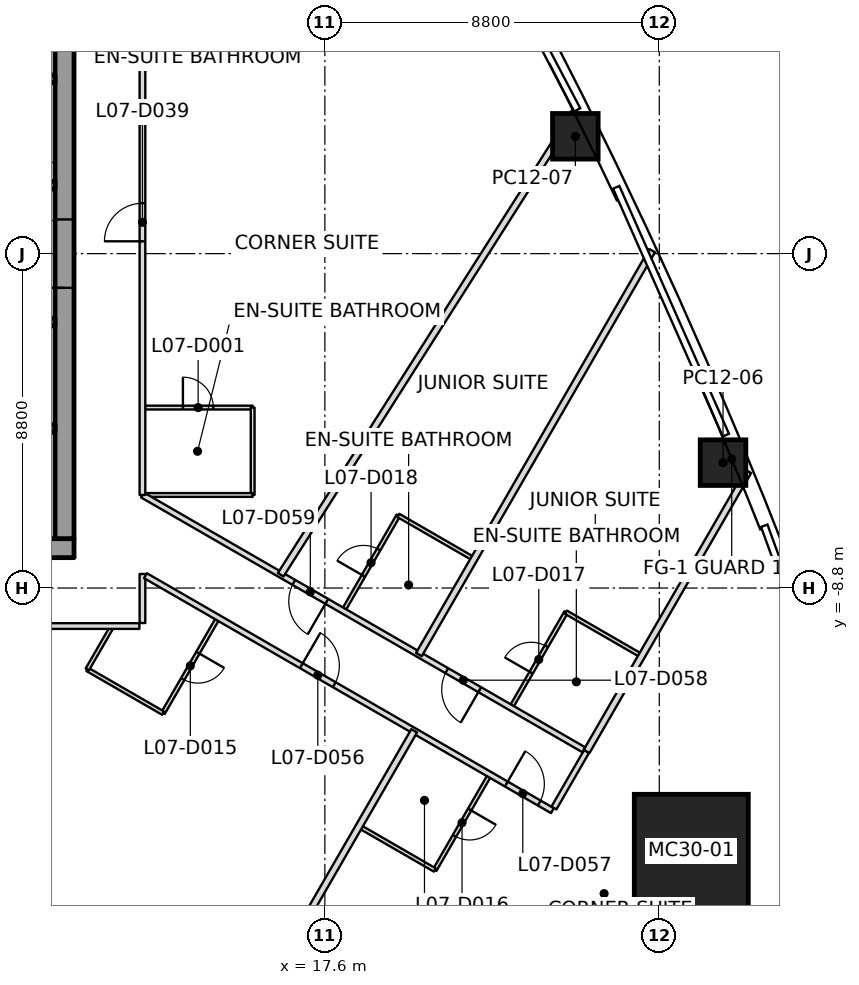
"""IFC4 building model, lengths in metres.
Left out: names, types, materials, properties, quantities, classifications, styles, units other than length and angle.
Written with IfcOpenShell. Run it as: python <this file> out.ifc"""

import sys

from ifc_helpers import new_model, si_unit, direction, frame, frame_2d, origin, origin_2d, place, context, subcontext, project, spatial, rectangle, extrude, clip, halfspace, element, fill, save


model = new_model("IFC4")
c1 = context("Model", 3, precision=1e-05, world=origin(), true_north=direction((0.0, 1.0)))
c2 = subcontext(c1, "Body", "Model", "MODEL_VIEW")
j1 = project(units=[si_unit("LENGTHUNIT", "METRE"), si_unit("PLANEANGLEUNIT", "RADIAN")], contexts=[c1])
p1 = place(None, origin())
s1 = spatial("IfcSite", under=j1, at=p1, CompositionType="ELEMENT")
p2 = place(p1, origin())
s2 = spatial("IfcBuilding", under=s1, at=p2, CompositionType="ELEMENT")
p3 = place(p2, frame((0.0, 0.0, 48.0)))
s3 = spatial("IfcBuildingStorey", under=s2, at=p3, CompositionType="ELEMENT", Elevation=48.0)
p4 = place(p3, frame((27.242, -15.728, 0.0), z_axis=(-0.030597838594, 0.017672889533, 0.99937552564), x_axis=(0.99953177652, 0.000541005533, 0.030593055416)))
e1 = element("IfcColumn", 1, at=p4, inside=s3, PredefinedType="COLUMN", context=c2, shape_type="SweptSolid", body=[
    clip(extrude(rectangle(XDim=3.0, YDim=3.0, at=origin_2d()), origin(), (0.0, 0.0, 1.0), 3.702), halfspace(frame((0.0, 0.0, 0.018)), True)),
])
p5 = place(p3, frame((28.077, -5.5, 0.0), z_axis=(-0.019526598325, 0.011016695677, 0.999748640596), x_axis=(-0.381957446123, 0.924011503162, -0.017642317722)))
e2 = element("IfcColumn", 2, at=p5, inside=s3, PredefinedType="COLUMN", context=c2, shape_type="SweptSolid", body=[
    clip(extrude(rectangle(XDim=1.2, YDim=1.2, at=origin_2d()), origin(), (0.0, 0.0, 1.0), 3.701), halfspace(frame((0.0, 0.0, 0.005)), True)),
])
p6 = place(p3, frame((24.191, 3.088, 0.0), z_axis=(-0.015306644787, 0.002309192102, 0.99988017995), x_axis=(-0.441920685772, 0.897010601558, -0.008836751577)))
e3 = element("IfcColumn", 3, at=p6, inside=s3, PredefinedType="COLUMN", context=c2, shape_type="SweptSolid", body=[
    clip(extrude(rectangle(XDim=1.2, YDim=1.2, at=origin_2d()), origin(), (0.0, 0.0, 1.0), 3.7), halfspace(frame((0.0, 0.0, 0.003)), True)),
])
p7 = place(p3, frame((-11.0, -7.75, 0.0), z_axis=(0.0, 0.0, 1.0), x_axis=(1.0, 0.0, 0.0)))
e4 = element("IfcWall", 4, at=p7, inside=s3, PredefinedType="SHEAR", context=c2, shape_type="SweptSolid", body=[
    extrude(rectangle(XDim=22.0, YDim=0.5, at=frame_2d((11.0, 0.0))), origin(), (0.0, 0.0, 1.0), 3.7),
])
p8 = place(p7, frame((10.45, 0.0, 0.0)))
e5 = element("IfcOpeningElement", 5, at=p8, cuts=e4, PredefinedType="OPENING", context=c2, shape_type="SweptSolid", body=[
    extrude(rectangle(XDim=1.1, YDim=2.1, at=frame_2d((0.55, 1.05))), frame((0.0, 0.25, 0.0), z_axis=(0.0, -1.0, 0.0), x_axis=(1.0, 0.0, 0.0)), (0.0, 0.0, 1.0), 0.5),
])
p9 = place(p3, frame((10.75, -7.5, 0.0), z_axis=(0.0, 0.0, 1.0), x_axis=(0.0, 1.0, 0.0)))
e6 = element("IfcWall", 6, at=p9, inside=s3, PredefinedType="SHEAR", context=c2, shape_type="SweptSolid", body=[
    extrude(rectangle(XDim=15.0, YDim=0.5, at=frame_2d((7.5, 0.0))), origin(), (0.0, 0.0, 1.0), 3.7),
])
p10 = place(p9, frame((6.6, 0.0, 0.0)))
e7 = element("IfcOpeningElement", 7, at=p10, cuts=e6, PredefinedType="OPENING", context=c2, shape_type="SweptSolid", body=[
    extrude(rectangle(XDim=1.8, YDim=2.1, at=frame_2d((0.9, 1.05))), frame((0.0, 0.25, 0.0), z_axis=(0.0, -1.0, 0.0), x_axis=(1.0, 0.0, 0.0)), (0.0, 0.0, 1.0), 0.5),
])
p11 = place(p3, frame((8.7, -4.6, 0.0), z_axis=(0.0, 0.0, 1.0), x_axis=(1.0, 0.0, 0.0)))
e8 = element("IfcWall", 8, at=p11, inside=s3, PredefinedType="SOLIDWALL", context=c2, shape_type="SweptSolid", body=[
    extrude(rectangle(XDim=1.8, YDim=0.2, at=frame_2d((0.9, 0.0))), origin(), (0.0, 0.0, 1.0), 3.55),
])
p12 = place(p11, frame((0.7, 0.0, 0.0)))
e9 = element("IfcOpeningElement", 9, at=p12, cuts=e8, PredefinedType="OPENING", context=c2, shape_type="SweptSolid", body=[
    extrude(rectangle(XDim=1.0, YDim=2.1, at=frame_2d((0.5, 1.05))), frame((0.0, 0.1, 0.0), z_axis=(0.0, -1.0, 0.0), x_axis=(1.0, 0.0, 0.0)), (0.0, 0.0, 1.0), 0.2),
])
p13 = place(p3, frame((8.7, -1.8, 0.0), z_axis=(0.0, 0.0, 1.0), x_axis=(1.0, 0.0, 0.0)))
e10 = element("IfcWall", 10, at=p13, inside=s3, PredefinedType="SOLIDWALL", context=c2, shape_type="SweptSolid", body=[
    extrude(rectangle(XDim=1.8, YDim=0.2, at=frame_2d((0.9, 0.0))), origin(), (0.0, 0.0, 1.0), 3.55),
])
p14 = place(p13, frame((0.35, 0.0, 0.0)))
e11 = element("IfcOpeningElement", 11, at=p14, cuts=e10, PredefinedType="OPENING", context=c2, shape_type="SweptSolid", body=[
    extrude(rectangle(XDim=1.1, YDim=2.1, at=frame_2d((0.55, 1.05))), frame((0.0, 0.1, 0.0), z_axis=(0.0, -1.0, 0.0), x_axis=(1.0, 0.0, 0.0)), (0.0, 0.0, 1.0), 0.2),
])
p15 = place(p3, frame((10.5, 1.8, 0.0), z_axis=(0.0, 0.0, 1.0), x_axis=(-1.0, 0.0, 0.0)))
e12 = element("IfcWall", 12, at=p15, inside=s3, PredefinedType="SOLIDWALL", context=c2, shape_type="SweptSolid", body=[
    extrude(rectangle(XDim=1.8, YDim=0.2, at=frame_2d((0.9, 0.0))), origin(), (0.0, 0.0, 1.0), 3.55),
])
p16 = place(p15, frame((0.4, 0.0, 0.0)))
e13 = element("IfcOpeningElement", 13, at=p16, cuts=e12, PredefinedType="OPENING", context=c2, shape_type="SweptSolid", body=[
    extrude(rectangle(XDim=1.0, YDim=2.1, at=frame_2d((0.5, 1.05))), frame((0.0, 0.1, 0.0), z_axis=(0.0, -1.0, 0.0), x_axis=(1.0, 0.0, 0.0)), (0.0, 0.0, 1.0), 0.2),
])
p17 = place(p3, frame((10.5, 4.6, 0.0), z_axis=(0.0, 0.0, 1.0), x_axis=(-1.0, 0.0, 0.0)))
e14 = element("IfcWall", 14, at=p17, inside=s3, PredefinedType="SOLIDWALL", context=c2, shape_type="SweptSolid", body=[
    extrude(rectangle(XDim=1.8, YDim=0.2, at=frame_2d((0.9, 0.0))), origin(), (0.0, 0.0, 1.0), 3.55),
])
p18 = place(p3, frame((19.95, -12.558, 0.0), z_axis=(0.0, 0.0, 1.0), x_axis=(-0.500004228592, -0.866022962392, 0.0)))
e15 = element("IfcWall", 15, at=p18, inside=s3, PredefinedType="PARTITIONING", context=c2, shape_type="SweptSolid", body=[
    extrude(rectangle(XDim=14.3, YDim=0.175, at=frame_2d((7.15, 0.0))), origin(), (0.0, 0.0, 1.0), 2.797),
])
p19 = place(p3, frame((24.174, 3.728, 0.0), z_axis=(0.0, 0.0, 1.0), x_axis=(-0.536240308602, -0.844065359691, 0.0)))
e16 = element("IfcWall", 16, at=p19, inside=s3, PredefinedType="PARTITIONING", context=c2, shape_type="SweptSolid", body=[
    extrude(rectangle(XDim=14.428, YDim=0.175, at=frame_2d((7.214, 0.0))), origin(), (0.0, 0.0, 1.0), 2.947),
])
p20 = place(p3, frame((20.075, -10.551, 0.0), z_axis=(0.0, 0.0, 1.0), x_axis=(0.499996220184, 0.866027586051, 0.0)))
e17 = element("IfcWall", 17, at=p20, inside=s3, PredefinedType="PARTITIONING", context=c2, shape_type="SweptSolid", body=[
    extrude(rectangle(XDim=12.274, YDim=0.175, at=frame_2d((6.137, 0.0))), origin(), (0.0, 0.0, 1.0), 2.934),
])
p21 = place(p3, frame((24.488, -13.099, 0.0), z_axis=(0.0, 0.0, 1.0), x_axis=(0.500003147101, 0.866023586797, 0.0)))
e18 = element("IfcWall", 18, at=p21, inside=s3, PredefinedType="PARTITIONING", context=c2, shape_type="SweptSolid", body=[
    extrude(rectangle(XDim=8.508, YDim=0.175, at=frame_2d((4.254, 0.0))), origin(), (0.0, 0.0, 1.0), 2.934),
])
p22 = place(p3, frame((-12.72, -9.8, 0.0), z_axis=(0.0, 0.0, 1.0), x_axis=(1.0, 0.0, 0.0)))
e19 = element("IfcWall", 19, at=p22, inside=s3, PredefinedType="PARTITIONING", context=c2, shape_type="SweptSolid", body=[
    extrude(rectangle(XDim=25.44, YDim=0.15, at=frame_2d((12.72, 0.0))), origin(), (0.0, 0.0, 1.0), 2.947),
])
p23 = place(p22, frame((7.32, 0.0, 0.0)))
e20 = element("IfcOpeningElement", 20, at=p23, cuts=e19, PredefinedType="OPENING", context=c2, shape_type="SweptSolid", body=[
    extrude(rectangle(XDim=1.0, YDim=2.1, at=frame_2d((0.5, 1.05))), frame((0.0, 0.075, 0.0), z_axis=(0.0, -1.0, 0.0), x_axis=(1.0, 0.0, 0.0)), (0.0, 0.0, 1.0), 0.15),
])
p24 = place(p22, frame((11.52, 0.0, 0.0)))
e21 = element("IfcOpeningElement", 21, at=p24, cuts=e19, PredefinedType="OPENING", context=c2, shape_type="SweptSolid", body=[
    extrude(rectangle(XDim=1.0, YDim=2.1, at=frame_2d((0.5, 1.05))), frame((0.0, 0.075, 0.0), z_axis=(0.0, -1.0, 0.0), x_axis=(1.0, 0.0, 0.0)), (0.0, 0.0, 1.0), 0.15),
])
p25 = place(p22, frame((15.72, 0.0, 0.0)))
e22 = element("IfcOpeningElement", 22, at=p25, cuts=e19, PredefinedType="OPENING", context=c2, shape_type="SweptSolid", body=[
    extrude(rectangle(XDim=1.0, YDim=2.1, at=frame_2d((0.5, 1.05))), frame((0.0, 0.075, 0.0), z_axis=(0.0, -1.0, 0.0), x_axis=(1.0, 0.0, 0.0)), (0.0, 0.0, 1.0), 0.15),
])
p26 = place(p22, frame((19.92, 0.0, 0.0)))
e23 = element("IfcOpeningElement", 23, at=p26, cuts=e19, PredefinedType="OPENING", context=c2, shape_type="SweptSolid", body=[
    extrude(rectangle(XDim=1.0, YDim=2.1, at=frame_2d((0.5, 1.05))), frame((0.0, 0.075, 0.0), z_axis=(0.0, -1.0, 0.0), x_axis=(1.0, 0.0, 0.0)), (0.0, 0.0, 1.0), 0.15),
])
p27 = place(p3, frame((12.8, -9.72, 0.0), z_axis=(0.0, 0.0, 1.0), x_axis=(0.0, 1.0, 0.0)))
e24 = element("IfcWall", 24, at=p27, inside=s3, PredefinedType="PARTITIONING", context=c2, shape_type="SweptSolid", body=[
    extrude(rectangle(XDim=1.291, YDim=0.15, at=frame_2d((0.646, 0.0))), origin(), (0.0, 0.0, 1.0), 2.797),
])
p28 = place(p3, frame((12.879, -8.475, 0.0), z_axis=(0.0, 0.0, 1.0), x_axis=(0.866021836803, -0.500006178143, 0.0)))
e25 = element("IfcWall", 25, at=p28, inside=s3, PredefinedType="PARTITIONING", context=c2, shape_type="SweptSolid", body=[
    extrude(rectangle(XDim=12.365, YDim=0.15, at=frame_2d((6.182, 0.0))), origin(), (0.0, 0.0, 1.0), 2.797),
])
p29 = place(p28, frame((4.737, 0.0, 0.0)))
e26 = element("IfcOpeningElement", 26, at=p29, cuts=e25, PredefinedType="OPENING", context=c2, shape_type="SweptSolid", body=[
    extrude(rectangle(XDim=1.0, YDim=2.1, at=frame_2d((0.5, 1.05))), frame((0.0, 0.075, 0.0), z_axis=(0.0, -1.0, 0.0), x_axis=(1.0, 0.0, 0.0)), (0.0, 0.0, 1.0), 0.15),
])
p30 = place(p28, frame((10.965, 0.0, 0.0)))
e27 = element("IfcOpeningElement", 27, at=p30, cuts=e25, PredefinedType="OPENING", context=c2, shape_type="SweptSolid", body=[
    extrude(rectangle(XDim=1.0, YDim=2.1, at=frame_2d((0.5, 1.05))), frame((0.0, 0.075, 0.0), z_axis=(0.0, -1.0, 0.0), x_axis=(1.0, 0.0, 0.0)), (0.0, 0.0, 1.0), 0.15),
])
p31 = place(p3, frame((23.627, -14.588, 0.0), z_axis=(0.0, 0.0, 1.0), x_axis=(0.500062383118, 0.865989383878, 0.0)))
e28 = element("IfcWall", 28, at=p31, inside=s3, PredefinedType="PARTITIONING", context=c2, shape_type="SweptSolid", body=[
    extrude(rectangle(XDim=1.72, YDim=0.15, at=frame_2d((0.86, 0.0))), origin(), (0.0, 0.0, 1.0), 2.797),
])
p32 = place(p3, frame((24.418, -13.059, 0.0), z_axis=(0.0, 0.0, 1.0), x_axis=(-0.866024967305, 0.500000756004, 0.0)))
e29 = element("IfcWall", 29, at=p32, inside=s3, PredefinedType="PARTITIONING", context=c2, shape_type="SweptSolid", body=[
    extrude(rectangle(XDim=13.416, YDim=0.15, at=frame_2d((6.708, 0.0))), origin(), (0.0, 0.0, 1.0), 2.947),
])
p33 = place(p32, frame((3.168, 0.0, 0.0)))
e30 = element("IfcOpeningElement", 30, at=p33, cuts=e29, PredefinedType="OPENING", context=c2, shape_type="SweptSolid", body=[
    extrude(rectangle(XDim=1.0, YDim=2.1, at=frame_2d((0.5, 1.05))), frame((0.0, 0.075, 0.0), z_axis=(0.0, -1.0, 0.0), x_axis=(1.0, 0.0, 0.0)), (0.0, 0.0, 1.0), 0.15),
])
p34 = place(p32, frame((7.815, 0.0, 0.0)))
e31 = element("IfcOpeningElement", 31, at=p34, cuts=e29, PredefinedType="OPENING", context=c2, shape_type="SweptSolid", body=[
    extrude(rectangle(XDim=1.0, YDim=2.1, at=frame_2d((0.5, 1.05))), frame((0.0, 0.075, 0.0), z_axis=(0.0, -1.0, 0.0), x_axis=(1.0, 0.0, 0.0)), (0.0, 0.0, 1.0), 0.15),
])
p35 = place(p3, frame((12.8, -6.351, 0.0), z_axis=(0.0, 0.0, 1.0), x_axis=(0.0, 1.0, 0.0)))
e32 = element("IfcWall", 32, at=p35, inside=s3, PredefinedType="PARTITIONING", context=c2, shape_type="SweptSolid", body=[
    extrude(rectangle(XDim=16.071, YDim=0.15, at=frame_2d((8.035, 0.0))), origin(), (0.0, 0.0, 1.0), 3.017),
])
p36 = place(p35, frame((6.676, 0.0, 0.0)))
e33 = element("IfcOpeningElement", 33, at=p36, cuts=e32, PredefinedType="OPENING", context=c2, shape_type="SweptSolid", body=[
    extrude(rectangle(XDim=1.0, YDim=2.1, at=frame_2d((0.5, 1.05))), frame((0.0, 0.075, 0.0), z_axis=(0.0, -1.0, 0.0), x_axis=(1.0, 0.0, 0.0)), (0.0, 0.0, 1.0), 0.15),
])
p37 = place(p35, frame((14.751, 0.0, 0.0)))
e34 = element("IfcOpeningElement", 34, at=p37, cuts=e32, PredefinedType="OPENING", context=c2, shape_type="SweptSolid", body=[
    extrude(rectangle(XDim=1.0, YDim=2.1, at=frame_2d((0.5, 1.05))), frame((0.0, 0.075, 0.0), z_axis=(0.0, -1.0, 0.0), x_axis=(1.0, 0.0, 0.0)), (0.0, 0.0, 1.0), 0.15),
])
p38 = place(p3, frame((14.777, -9.605, 0.0), z_axis=(0.0, 0.0, 1.0), x_axis=(-0.499999802827, -0.866025517622, 0.0)))
e35 = element("IfcWall", 35, at=p38, inside=s3, PredefinedType="PARTITIONING", context=c2, shape_type="SweptSolid", body=[
    extrude(rectangle(XDim=2.87, YDim=0.1, at=frame_2d((1.435, 0.0))), origin(), (0.0, 0.0, 1.0), 2.797),
])
p39 = place(p38, frame((1.035, 0.0, 0.0)))
e36 = element("IfcOpeningElement", 36, at=p39, cuts=e35, PredefinedType="OPENING", context=c2, shape_type="SweptSolid", body=[
    extrude(rectangle(XDim=0.8, YDim=2.1, at=frame_2d((0.4, 1.05))), frame((0.0, 0.05, 0.0), z_axis=(0.0, -1.0, 0.0), x_axis=(1.0, 0.0, 0.0)), (0.0, 0.0, 1.0), 0.1),
])
p40 = place(p3, frame((13.342, -12.091, 0.0), z_axis=(0.0, 0.0, 1.0), x_axis=(-0.86602648383, 0.499998129301, 0.0)))
e37 = element("IfcWall", 37, at=p40, inside=s3, PredefinedType="PARTITIONING", context=c2, shape_type="SweptSolid", body=[
    extrude(rectangle(XDim=2.3, YDim=0.1, at=frame_2d((1.15, 0.0))), origin(), (0.0, 0.0, 1.0), 2.947),
])
p41 = place(p3, frame((11.35, -10.941, 0.0), z_axis=(0.0, 0.0, 1.0), x_axis=(0.499865263774, 0.866103179807, 0.0)))
e38 = element("IfcWall", 38, at=p41, inside=s3, PredefinedType="PARTITIONING", context=c2, shape_type="SweptSolid", body=[
    extrude(rectangle(XDim=1.282, YDim=0.1, at=frame_2d((0.641, 0.0))), origin(), (0.0, 0.0, 1.0), 3.15),
])
p42 = place(p3, frame((12.83, -4.051, 0.0), z_axis=(0.0, 0.0, 1.0), x_axis=(1.0, 0.0, 0.0)))
e39 = element("IfcWall", 39, at=p42, inside=s3, PredefinedType="PARTITIONING", context=c2, shape_type="SweptSolid", body=[
    extrude(rectangle(XDim=2.87, YDim=0.1, at=frame_2d((1.435, 0.0))), origin(), (0.0, 0.0, 1.0), 3.15),
])
p43 = place(p42, frame((1.035, 0.0, 0.0)))
e40 = element("IfcOpeningElement", 40, at=p43, cuts=e39, PredefinedType="OPENING", context=c2, shape_type="SweptSolid", body=[
    extrude(rectangle(XDim=0.8, YDim=2.1, at=frame_2d((0.4, 1.05))), frame((0.0, 0.05, 0.0), z_axis=(0.0, -1.0, 0.0), x_axis=(1.0, 0.0, 0.0)), (0.0, 0.0, 1.0), 0.1),
])
p44 = place(p3, frame((15.7, -4.051, 0.0), z_axis=(0.0, 0.0, 1.0), x_axis=(0.0, -1.0, 0.0)))
e41 = element("IfcWall", 41, at=p44, inside=s3, PredefinedType="PARTITIONING", context=c2, shape_type="SweptSolid", body=[
    extrude(rectangle(XDim=2.3, YDim=0.1, at=frame_2d((1.15, 0.0))), origin(), (0.0, 0.0, 1.0), 2.947),
])
p45 = place(p3, frame((15.7, -6.351, 0.0), z_axis=(0.0, 0.0, 1.0), x_axis=(-1.0, 0.0, 0.0)))
e42 = element("IfcWall", 42, at=p45, inside=s3, PredefinedType="PARTITIONING", context=c2, shape_type="SweptSolid", body=[
    extrude(rectangle(XDim=2.84, YDim=0.1, at=frame_2d((1.42, 0.0))), origin(), (0.0, 0.0, 1.0), 2.947),
])
p46 = place(p3, frame((18.098, -9.375, 0.0), z_axis=(0.0, 0.0, 1.0), x_axis=(0.499936001555, 0.866062350151, 0.0)))
e43 = element("IfcWall", 43, at=p46, inside=s3, PredefinedType="PARTITIONING", context=c2, shape_type="SweptSolid", body=[
    extrude(rectangle(XDim=2.87, YDim=0.1, at=frame_2d((1.435, 0.0))), origin(), (0.0, 0.0, 1.0), 2.947),
])
p47 = place(p46, frame((1.035, 0.0, 0.0)))
e44 = element("IfcOpeningElement", 44, at=p47, cuts=e43, PredefinedType="OPENING", context=c2, shape_type="SweptSolid", body=[
    extrude(rectangle(XDim=0.8, YDim=2.1, at=frame_2d((0.4, 1.05))), frame((0.0, 0.05, 0.0), z_axis=(0.0, -1.0, 0.0), x_axis=(1.0, 0.0, 0.0)), (0.0, 0.0, 1.0), 0.1),
])
p48 = place(p3, frame((19.533, -6.889, 0.0), z_axis=(0.0, 0.0, 1.0), x_axis=(0.866017224141, -0.500014167291, 0.0)))
e45 = element("IfcWall", 45, at=p48, inside=s3, PredefinedType="PARTITIONING", context=c2, shape_type="SweptSolid", body=[
    extrude(rectangle(XDim=2.27, YDim=0.1, at=frame_2d((1.135, 0.0))), origin(), (0.0, 0.0, 1.0), 2.947),
])
p49 = place(p3, frame((21.927, -13.733, 0.0), z_axis=(0.0, 0.0, 1.0), x_axis=(-0.499936001555, -0.866062350151, 0.0)))
e46 = element("IfcWall", 46, at=p49, inside=s3, PredefinedType="PARTITIONING", context=c2, shape_type="SweptSolid", body=[
    extrude(rectangle(XDim=2.87, YDim=0.1, at=frame_2d((1.435, 0.0))), origin(), (0.0, 0.0, 1.0), 3.15),
])
p50 = place(p49, frame((1.035, 0.0, 0.0)))
e47 = element("IfcOpeningElement", 47, at=p50, cuts=e46, PredefinedType="OPENING", context=c2, shape_type="SweptSolid", body=[
    extrude(rectangle(XDim=0.8, YDim=2.1, at=frame_2d((0.4, 1.05))), frame((0.0, 0.05, 0.0), z_axis=(0.0, -1.0, 0.0), x_axis=(1.0, 0.0, 0.0)), (0.0, 0.0, 1.0), 0.1),
])
p51 = place(p3, frame((20.492, -16.219, 0.0), z_axis=(0.0, 0.0, 1.0), x_axis=(-0.866044110172, 0.499967598186, 0.0)))
e48 = element("IfcWall", 48, at=p51, inside=s3, PredefinedType="PARTITIONING", context=c2, shape_type="SweptSolid", body=[
    extrude(rectangle(XDim=2.27, YDim=0.1, at=frame_2d((1.135, 0.0))), origin(), (0.0, 0.0, 1.0), 3.15),
])
p52 = place(p3, frame((22.511, -11.923, 0.0), z_axis=(0.0, 0.0, 1.0), x_axis=(0.500036638401, 0.866004249561, 0.0)))
e49 = element("IfcWall", 49, at=p52, inside=s3, PredefinedType="PARTITIONING", context=c2, shape_type="SweptSolid", body=[
    extrude(rectangle(XDim=2.87, YDim=0.1, at=frame_2d((1.435, 0.0))), origin(), (0.0, 0.0, 1.0), 3.15),
])
p53 = place(p52, frame((1.035, 0.0, 0.0)))
e50 = element("IfcOpeningElement", 50, at=p53, cuts=e49, PredefinedType="OPENING", context=c2, shape_type="SweptSolid", body=[
    extrude(rectangle(XDim=0.8, YDim=2.1, at=frame_2d((0.4, 1.05))), frame((0.0, 0.05, 0.0), z_axis=(0.0, -1.0, 0.0), x_axis=(1.0, 0.0, 0.0)), (0.0, 0.0, 1.0), 0.1),
])
p54 = place(p3, frame((23.946, -9.437, 0.0), z_axis=(0.0, 0.0, 1.0), x_axis=(0.866017224141, -0.500014167291, 0.0)))
e51 = element("IfcWall", 51, at=p54, inside=s3, PredefinedType="PARTITIONING", context=c2, shape_type="SweptSolid", body=[
    extrude(rectangle(XDim=2.27, YDim=0.1, at=frame_2d((1.135, 0.0))), origin(), (0.0, 0.0, 1.0), 3.15),
])
p55 = place(p36, origin())
e52 = element("IfcDoor", 52, at=p55, inside=s3, OperationType="SINGLE_SWING_LEFT", PredefinedType="DOOR", context=c2, shape_type="SweptSolid", body=[
    extrude(rectangle(XDim=1.0, YDim=2.1, at=frame_2d((0.5, 1.05))), frame((0.0, 0.025, 0.0), z_axis=(0.0, -1.0, 0.0), x_axis=(1.0, 0.0, 0.0)), (0.0, 0.0, 1.0), 0.05),
])
fill(e33, e52)
p56 = place(p43, origin())
e53 = element("IfcDoor", 53, at=p56, inside=s3, OperationType="SINGLE_SWING_RIGHT", PredefinedType="DOOR", context=c2, shape_type="SweptSolid", body=[
    extrude(rectangle(XDim=0.8, YDim=2.1, at=frame_2d((0.4, 1.05))), frame((0.0, 0.025, 0.0), z_axis=(0.0, -1.0, 0.0), x_axis=(1.0, 0.0, 0.0)), (0.0, 0.0, 1.0), 0.05),
])
fill(e40, e53)
p57 = place(p29, origin())
e54 = element("IfcDoor", 54, at=p57, inside=s3, OperationType="SINGLE_SWING_LEFT", PredefinedType="DOOR", context=c2, shape_type="SweptSolid", body=[
    extrude(rectangle(XDim=1.0, YDim=2.1, at=frame_2d((0.5, 1.05))), frame((0.0, 0.025, 0.0), z_axis=(0.0, -1.0, 0.0), x_axis=(1.0, 0.0, 0.0)), (0.0, 0.0, 1.0), 0.05),
])
fill(e26, e54)
p58 = place(p39, origin())
e55 = element("IfcDoor", 55, at=p58, inside=s3, OperationType="SINGLE_SWING_LEFT", PredefinedType="DOOR", context=c2, shape_type="SweptSolid", body=[
    extrude(rectangle(XDim=0.8, YDim=2.1, at=frame_2d((0.4, 1.05))), frame((0.0, 0.025, 0.0), z_axis=(0.0, -1.0, 0.0), x_axis=(1.0, 0.0, 0.0)), (0.0, 0.0, 1.0), 0.05),
])
fill(e36, e55)
p59 = place(p30, origin())
e56 = element("IfcDoor", 56, at=p59, inside=s3, OperationType="SINGLE_SWING_LEFT", PredefinedType="DOOR", context=c2, shape_type="SweptSolid", body=[
    extrude(rectangle(XDim=1.0, YDim=2.1, at=frame_2d((0.5, 1.05))), frame((0.0, 0.025, 0.0), z_axis=(0.0, -1.0, 0.0), x_axis=(1.0, 0.0, 0.0)), (0.0, 0.0, 1.0), 0.05),
])
fill(e27, e56)
p60 = place(p50, origin())
e57 = element("IfcDoor", 57, at=p60, inside=s3, OperationType="SINGLE_SWING_LEFT", PredefinedType="DOOR", context=c2, shape_type="SweptSolid", body=[
    extrude(rectangle(XDim=0.8, YDim=2.1, at=frame_2d((0.4, 1.05))), frame((0.0, 0.025, 0.0), z_axis=(0.0, -1.0, 0.0), x_axis=(1.0, 0.0, 0.0)), (0.0, 0.0, 1.0), 0.05),
])
fill(e47, e57)
p61 = place(p33, origin())
e58 = element("IfcDoor", 58, at=p61, inside=s3, OperationType="SINGLE_SWING_LEFT", PredefinedType="DOOR", context=c2, shape_type="SweptSolid", body=[
    extrude(rectangle(XDim=1.0, YDim=2.1, at=frame_2d((0.5, 1.05))), frame((0.0, 0.025, 0.0), z_axis=(0.0, -1.0, 0.0), x_axis=(1.0, 0.0, 0.0)), (0.0, 0.0, 1.0), 0.05),
])
fill(e30, e58)
p62 = place(p53, origin())
e59 = element("IfcDoor", 59, at=p62, inside=s3, OperationType="SINGLE_SWING_RIGHT", PredefinedType="DOOR", context=c2, shape_type="SweptSolid", body=[
    extrude(rectangle(XDim=0.8, YDim=2.1, at=frame_2d((0.4, 1.05))), frame((0.0, 0.025, 0.0), z_axis=(0.0, -1.0, 0.0), x_axis=(1.0, 0.0, 0.0)), (0.0, 0.0, 1.0), 0.05),
])
fill(e50, e59)
p63 = place(p34, origin())
e60 = element("IfcDoor", 60, at=p63, inside=s3, OperationType="SINGLE_SWING_LEFT", PredefinedType="DOOR", context=c2, shape_type="SweptSolid", body=[
    extrude(rectangle(XDim=1.0, YDim=2.1, at=frame_2d((0.5, 1.05))), frame((0.0, 0.025, 0.0), z_axis=(0.0, -1.0, 0.0), x_axis=(1.0, 0.0, 0.0)), (0.0, 0.0, 1.0), 0.05),
])
fill(e31, e60)
p64 = place(p47, origin())
e61 = element("IfcDoor", 61, at=p64, inside=s3, OperationType="SINGLE_SWING_LEFT", PredefinedType="DOOR", context=c2, shape_type="SweptSolid", body=[
    extrude(rectangle(XDim=0.8, YDim=2.1, at=frame_2d((0.4, 1.05))), frame((0.0, 0.025, 0.0), z_axis=(0.0, -1.0, 0.0), x_axis=(1.0, 0.0, 0.0)), (0.0, 0.0, 1.0), 0.05),
])
fill(e44, e61)
p65 = place(p10, origin())
e62 = element("IfcDoor", 62, at=p65, inside=s3, OperationType="DOUBLE_DOOR_SINGLE_SWING", PredefinedType="DOOR", context=c2, shape_type="SweptSolid", body=[
    extrude(rectangle(XDim=1.8, YDim=2.1, at=frame_2d((0.9, 1.05))), frame((0.0, 0.025, 0.0), z_axis=(0.0, -1.0, 0.0), x_axis=(1.0, 0.0, 0.0)), (0.0, 0.0, 1.0), 0.05),
])
fill(e7, e62)
save(model, sys.argv[1])
